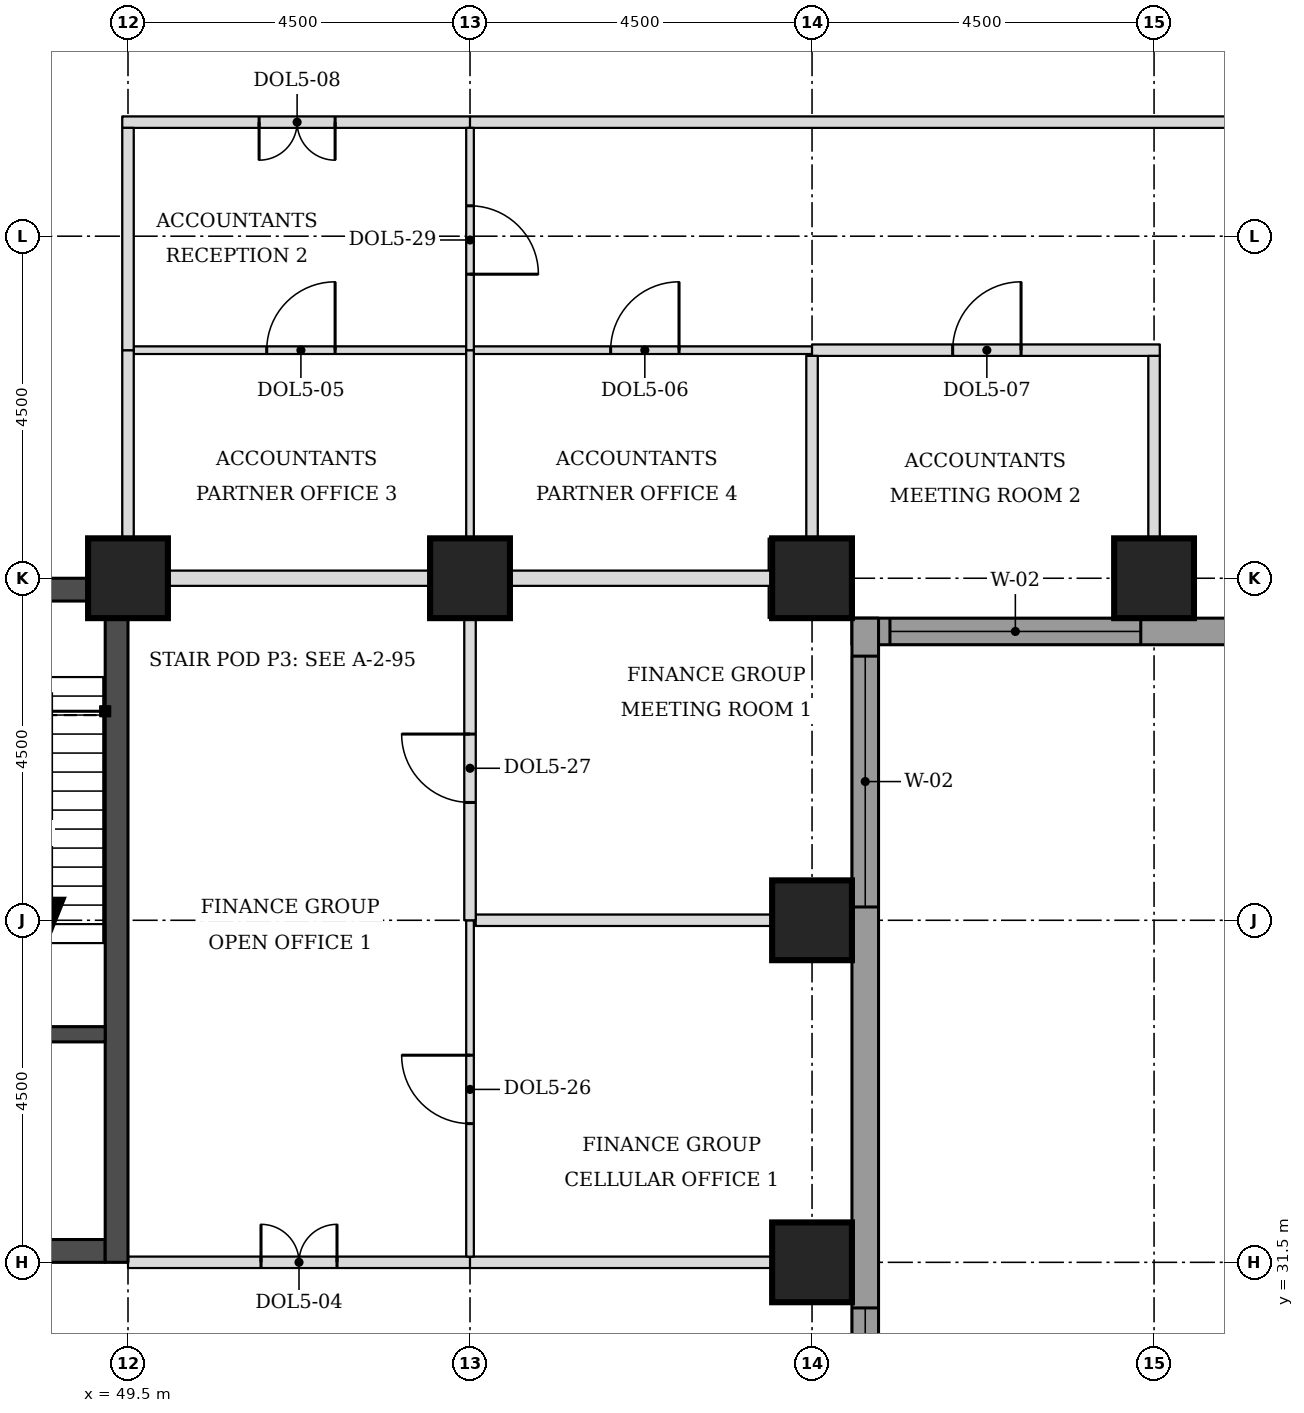
"""IFC4 building model, lengths in metres.
Left out: names, types, materials, properties, quantities, classifications, styles, units other than length and angle.
Written with IfcOpenShell. Run it as: python <this file> out.ifc"""

import sys

from ifc_helpers import new_model, si_unit, direction, frame, frame_2d, origin, origin_2d, place, context, subcontext, project, spatial, rectangle, extrude, element, fill, save


model = new_model("IFC4")
c1 = context("Model", 3, precision=1e-05, world=origin(), true_north=direction((0.0, 1.0)))
c2 = subcontext(c1, "Body", "Model", "MODEL_VIEW")
j1 = project(units=[si_unit("LENGTHUNIT", "METRE"), si_unit("PLANEANGLEUNIT", "RADIAN")], contexts=[c1])
p1 = place(None, origin())
s1 = spatial("IfcSite", under=j1, at=p1, CompositionType="ELEMENT")
p2 = place(p1, origin())
s2 = spatial("IfcBuilding", under=s1, at=p2, CompositionType="ELEMENT")
p3 = place(p2, frame((0.0, 0.0, 112.2)))
s3 = spatial("IfcBuildingStorey", under=s2, at=p3, CompositionType="ELEMENT", Elevation=112.2)
for number, where, z_axis, x_axis in (
    (1, (58.5, 31.5, 0.0), (0.0, 0.0, 1.0), (1.0, 0.0, 0.0)),
    (2, (58.5, 36.0, 0.0), (0.0, 0.0, 1.0), (1.0, 0.0, 0.0)),
    (3, (49.5, 40.5, 0.0), (0.0, 0.0, 1.0), (1.0, 0.0, 0.0)),
    (4, (54.0, 40.5, 0.0), (0.0, 0.0, 1.0), (1.0, 0.0, 0.0)),
    (5, (58.5, 40.5, 0.0), (0.0, 0.0, 1.0), (1.0, 0.0, 0.0)),
    (6, (63.0, 40.5, 0.0), (0.0, 0.0, 1.0), (1.0, 0.0, 0.0)),
):
    element("IfcColumn", number, at=place(p3, frame(where, z_axis=z_axis, x_axis=x_axis)), inside=s3, PredefinedType="COLUMN", context=c2, shape_type="SweptSolid", body=[
        extrude(rectangle(XDim=1.05, YDim=1.05, at=origin_2d()), origin(), (0.0, 0.0, 1.0), 3.7),
    ])
p4 = place(p3, frame((40.8, 31.65, 0.0), z_axis=(0.0, 0.0, 1.0), x_axis=(1.0, 0.0, 0.0)))
e7 = element("IfcWall", 7, at=p4, inside=s3, PredefinedType="SHEAR", context=c2, shape_type="SweptSolid", body=[
    extrude(rectangle(XDim=8.4, YDim=0.3, at=frame_2d((4.2, 0.0))), origin(), (0.0, 0.0, 1.0), 3.7),
])
p5 = place(p4, frame((5.2, 0.0, 0.0)))
e8 = element("IfcOpeningElement", 8, at=p5, cuts=e7, PredefinedType="OPENING", context=c2, shape_type="SweptSolid", body=[
    extrude(rectangle(XDim=1.0, YDim=2.1, at=frame_2d((0.5, 1.05))), frame((0.0, 0.16, 0.0), z_axis=(0.0, -1.0, 0.0), x_axis=(1.0, 0.0, 0.0)), (0.0, 0.0, 1.0), 0.32),
])
p6 = place(p3, frame((40.8, 40.35, 0.0), z_axis=(0.0, 0.0, 1.0), x_axis=(1.0, 0.0, 0.0)))
e9 = element("IfcWall", 9, at=p6, inside=s3, PredefinedType="SHEAR", context=c2, shape_type="SweptSolid", body=[
    extrude(rectangle(XDim=8.4, YDim=0.3, at=frame_2d((4.2, 0.0))), origin(), (0.0, 0.0, 1.0), 3.7),
])
p7 = place(p6, frame((6.4, 0.0, 0.0)))
e10 = element("IfcOpeningElement", 10, at=p7, cuts=e9, PredefinedType="OPENING", context=c2, shape_type="SweptSolid", body=[
    extrude(rectangle(XDim=1.1, YDim=2.1, at=frame_2d((0.55, 1.05))), frame((0.0, 0.16, 0.0), z_axis=(0.0, -1.0, 0.0), x_axis=(1.0, 0.0, 0.0)), (0.0, 0.0, 1.0), 0.32),
])
p8 = place(p3, frame((49.35, 31.5, 0.0), z_axis=(0.0, 0.0, 1.0), x_axis=(0.0, 1.0, 0.0)))
e11 = element("IfcWall", 11, at=p8, inside=s3, PredefinedType="SHEAR", context=c2, shape_type="SweptSolid", body=[
    extrude(rectangle(XDim=9.0, YDim=0.3, at=frame_2d((4.5, 0.0))), origin(), (0.0, 0.0, 1.0), 3.7),
])
p9 = place(p3, frame((59.025, 39.8, 0.0), z_axis=(0.0, 0.0, 1.0), x_axis=(1.0, 0.0, 0.0)))
e12 = element("IfcWall", 12, at=p9, inside=s3, PredefinedType="STANDARD", context=c2, shape_type="SweptSolid", body=[
    extrude(rectangle(XDim=13.337, YDim=0.35, at=frame_2d((6.669, 0.0))), origin(), (0.0, 0.0, 1.0), 3.525),
])
p10 = place(p9, frame((0.5, 0.0, 0.9)))
e13 = element("IfcOpeningElement", 13, at=p10, cuts=e12, PredefinedType="OPENING", context=c2, shape_type="SweptSolid", body=[
    extrude(rectangle(XDim=3.3, YDim=1.9, at=frame_2d((1.65, 0.95))), frame((0.0, 0.185, 0.0), z_axis=(0.0, -1.0, 0.0), x_axis=(1.0, 0.0, 0.0)), (0.0, 0.0, 1.0), 0.37),
])
p11 = place(p3, frame((59.2, 22.138, 0.0), z_axis=(0.0, 0.0, 1.0), x_axis=(0.0, 1.0, 0.0)))
e14 = element("IfcWall", 14, at=p11, inside=s3, PredefinedType="STANDARD", context=c2, shape_type="SweptSolid", body=[
    extrude(rectangle(XDim=17.837, YDim=0.35, at=frame_2d((8.919, 0.0))), origin(), (0.0, 0.0, 1.0), 3.525),
])
p12 = place(p11, frame((5.462, 0.0, 0.9)))
e15 = element("IfcOpeningElement", 15, at=p12, cuts=e14, PredefinedType="OPENING", context=c2, shape_type="SweptSolid", body=[
    extrude(rectangle(XDim=3.3, YDim=1.9, at=frame_2d((1.65, 0.95))), frame((0.0, 0.185, 0.0), z_axis=(0.0, -1.0, 0.0), x_axis=(1.0, 0.0, 0.0)), (0.0, 0.0, 1.0), 0.37),
])
p13 = place(p11, frame((14.037, 0.0, 0.9)))
e16 = element("IfcOpeningElement", 16, at=p13, cuts=e14, PredefinedType="OPENING", context=c2, shape_type="SweptSolid", body=[
    extrude(rectangle(XDim=3.3, YDim=1.9, at=frame_2d((1.65, 0.95))), frame((0.0, 0.185, 0.0), z_axis=(0.0, -1.0, 0.0), x_axis=(1.0, 0.0, 0.0)), (0.0, 0.0, 1.0), 0.37),
])
p14 = place(p3, frame((49.5, 31.5, 0.0), z_axis=(0.0, 0.0, 1.0), x_axis=(1.0, 0.0, 0.0)))
e17 = element("IfcWall", 17, at=p14, inside=s3, PredefinedType="PARTITIONING", context=c2, shape_type="SweptSolid", body=[
    extrude(rectangle(XDim=4.5, YDim=0.15, at=frame_2d((2.25, 0.0))), origin(), (0.0, 0.0, 1.0), 2.55),
])
p15 = place(p14, frame((1.75, 0.0, 0.0)))
e18 = element("IfcOpeningElement", 18, at=p15, cuts=e17, PredefinedType="OPENING", context=c2, shape_type="SweptSolid", body=[
    extrude(rectangle(XDim=1.0, YDim=2.1, at=frame_2d((0.5, 1.05))), frame((0.0, 0.085, 0.0), z_axis=(0.0, -1.0, 0.0), x_axis=(1.0, 0.0, 0.0)), (0.0, 0.0, 1.0), 0.17),
])
p16 = place(p3, frame((54.0, 31.5, 0.0), z_axis=(0.0, 0.0, 1.0), x_axis=(1.0, 0.0, 0.0)))
e19 = element("IfcWall", 19, at=p16, inside=s3, PredefinedType="PARTITIONING", context=c2, shape_type="SweptSolid", body=[
    extrude(rectangle(XDim=5.025, YDim=0.15, at=frame_2d((2.512, 0.0))), origin(), (0.0, 0.0, 1.0), 2.55),
])
p17 = place(p3, frame((54.075, 36.0, 0.0), z_axis=(0.0, 0.0, 1.0), x_axis=(1.0, 0.0, 0.0)))
e20 = element("IfcWall", 20, at=p17, inside=s3, PredefinedType="PARTITIONING", context=c2, shape_type="SweptSolid", body=[
    extrude(rectangle(XDim=4.95, YDim=0.15, at=frame_2d((2.475, 0.0))), origin(), (0.0, 0.0, 1.0), 3.096),
])
p18 = place(p3, frame((50.015, 40.5, 0.0), z_axis=(0.0, 0.0, 1.0), x_axis=(1.0, 0.0, 0.0)))
e21 = element("IfcWall", 21, at=p18, inside=s3, PredefinedType="PARTITIONING", context=c2, shape_type="SweptSolid", body=[
    extrude(rectangle(XDim=3.46, YDim=0.2, at=frame_2d((1.73, 0.0))), origin(), (0.0, 0.0, 1.0), 2.8),
])
p19 = place(p3, frame((54.495, 40.5, 0.0), z_axis=(0.0, 0.0, 1.0), x_axis=(1.0, 0.0, 0.0)))
e22 = element("IfcWall", 22, at=p19, inside=s3, PredefinedType="PARTITIONING", context=c2, shape_type="SweptSolid", body=[
    extrude(rectangle(XDim=3.48, YDim=0.2, at=frame_2d((1.74, 0.0))), origin(), (0.0, 0.0, 1.0), 2.8),
])
p20 = place(p3, frame((49.575, 43.5, 0.0), z_axis=(0.0, 0.0, 1.0), x_axis=(1.0, 0.0, 0.0)))
e23 = element("IfcWall", 23, at=p20, inside=s3, PredefinedType="PARTITIONING", context=c2, shape_type="SweptSolid", body=[
    extrude(rectangle(XDim=4.375, YDim=0.1, at=frame_2d((2.188, 0.0))), origin(), (0.0, 0.0, 1.0), 3.55),
])
p21 = place(p20, frame((1.75, 0.0, 0.0)))
e24 = element("IfcOpeningElement", 24, at=p21, cuts=e23, PredefinedType="OPENING", context=c2, shape_type="SweptSolid", body=[
    extrude(rectangle(XDim=0.9, YDim=2.1, at=frame_2d((0.45, 1.05))), frame((0.0, 0.06, 0.0), z_axis=(0.0, -1.0, 0.0), x_axis=(1.0, 0.0, 0.0)), (0.0, 0.0, 1.0), 0.12),
])
p22 = place(p3, frame((54.05, 43.5, 0.0), z_axis=(0.0, 0.0, 1.0), x_axis=(1.0, 0.0, 0.0)))
e25 = element("IfcWall", 25, at=p22, inside=s3, PredefinedType="PARTITIONING", context=c2, shape_type="SweptSolid", body=[
    extrude(rectangle(XDim=4.45, YDim=0.1, at=frame_2d((2.225, 0.0))), origin(), (0.0, 0.0, 1.0), 3.55),
])
p23 = place(p22, frame((1.8, 0.0, 0.0)))
e26 = element("IfcOpeningElement", 26, at=p23, cuts=e25, PredefinedType="OPENING", context=c2, shape_type="SweptSolid", body=[
    extrude(rectangle(XDim=0.9, YDim=2.1, at=frame_2d((0.45, 1.05))), frame((0.0, 0.06, 0.0), z_axis=(0.0, -1.0, 0.0), x_axis=(1.0, 0.0, 0.0)), (0.0, 0.0, 1.0), 0.12),
])
p24 = place(p3, frame((58.5, 43.5, 0.0), z_axis=(0.0, 0.0, 1.0), x_axis=(1.0, 0.0, 0.0)))
e27 = element("IfcWall", 27, at=p24, inside=s3, PredefinedType="PARTITIONING", context=c2, shape_type="SweptSolid", body=[
    extrude(rectangle(XDim=4.575, YDim=0.15, at=frame_2d((2.288, 0.0))), origin(), (0.0, 0.0, 1.0), 3.55),
])
p25 = place(p24, frame((1.85, 0.0, 0.0)))
e28 = element("IfcOpeningElement", 28, at=p25, cuts=e27, PredefinedType="OPENING", context=c2, shape_type="SweptSolid", body=[
    extrude(rectangle(XDim=0.9, YDim=2.1, at=frame_2d((0.45, 1.05))), frame((0.0, 0.085, 0.0), z_axis=(0.0, -1.0, 0.0), x_axis=(1.0, 0.0, 0.0)), (0.0, 0.0, 1.0), 0.17),
])
p26 = place(p3, frame((49.425, 46.5, 0.0), z_axis=(0.0, 0.0, 1.0), x_axis=(1.0, 0.0, 0.0)))
e29 = element("IfcWall", 29, at=p26, inside=s3, PredefinedType="PARTITIONING", context=c2, shape_type="SweptSolid", body=[
    extrude(rectangle(XDim=4.575, YDim=0.15, at=frame_2d((2.288, 0.0))), origin(), (0.0, 0.0, 1.0), 3.55),
])
p27 = place(p26, frame((1.8, 0.0, 0.0)))
e30 = element("IfcOpeningElement", 30, at=p27, cuts=e29, PredefinedType="OPENING", context=c2, shape_type="SweptSolid", body=[
    extrude(rectangle(XDim=1.0, YDim=2.1, at=frame_2d((0.5, 1.05))), frame((0.0, 0.085, 0.0), z_axis=(0.0, -1.0, 0.0), x_axis=(1.0, 0.0, 0.0)), (0.0, 0.0, 1.0), 0.17),
])
p28 = place(p3, frame((54.0, 46.5, 0.0), z_axis=(0.0, 0.0, 1.0), x_axis=(1.0, 0.0, 0.0)))
e31 = element("IfcWall", 31, at=p28, inside=s3, PredefinedType="PARTITIONING", context=c2, shape_type="SweptSolid", body=[
    extrude(rectangle(XDim=16.5, YDim=0.15, at=frame_2d((8.25, 0.0))), origin(), (0.0, 0.0, 1.0), 3.55),
])
p29 = place(p3, frame((54.0, 31.575, 0.0), z_axis=(0.0, 0.0, 1.0), x_axis=(0.0, 1.0, 0.0)))
e32 = element("IfcWall", 32, at=p29, inside=s3, PredefinedType="PARTITIONING", context=c2, shape_type="SweptSolid", body=[
    extrude(rectangle(XDim=4.425, YDim=0.1, at=frame_2d((2.212, 0.0))), origin(), (0.0, 0.0, 1.0), 3.55),
])
p30 = place(p29, frame((1.75, 0.0, 0.0)))
e33 = element("IfcOpeningElement", 33, at=p30, cuts=e32, PredefinedType="OPENING", context=c2, shape_type="SweptSolid", body=[
    extrude(rectangle(XDim=0.9, YDim=2.1, at=frame_2d((0.45, 1.05))), frame((0.0, 0.06, 0.0), z_axis=(0.0, -1.0, 0.0), x_axis=(1.0, 0.0, 0.0)), (0.0, 0.0, 1.0), 0.12),
])
p31 = place(p3, frame((54.0, 36.0, 0.0), z_axis=(0.0, 0.0, 1.0), x_axis=(0.0, 1.0, 0.0)))
e34 = element("IfcWall", 34, at=p31, inside=s3, PredefinedType="PARTITIONING", context=c2, shape_type="SweptSolid", body=[
    extrude(rectangle(XDim=3.975, YDim=0.15, at=frame_2d((1.988, 0.0))), origin(), (0.0, 0.0, 1.0), 3.55),
])
p32 = place(p31, frame((1.55, 0.0, 0.0)))
e35 = element("IfcOpeningElement", 35, at=p32, cuts=e34, PredefinedType="OPENING", context=c2, shape_type="SweptSolid", body=[
    extrude(rectangle(XDim=0.9, YDim=2.1, at=frame_2d((0.45, 1.05))), frame((0.0, 0.085, 0.0), z_axis=(0.0, -1.0, 0.0), x_axis=(1.0, 0.0, 0.0)), (0.0, 0.0, 1.0), 0.17),
])
p33 = place(p3, frame((63.0, 39.975, 0.0), z_axis=(0.0, 0.0, 1.0), x_axis=(0.0, 1.0, 0.0)))
e36 = element("IfcWall", 36, at=p33, inside=s3, PredefinedType="PARTITIONING", context=c2, shape_type="SweptSolid", body=[
    extrude(rectangle(XDim=3.45, YDim=0.15, at=frame_2d((1.725, 0.0))), origin(), (0.0, 0.0, 1.0), 3.55),
])
p34 = place(p3, frame((49.5, 41.025, 0.0), z_axis=(0.0, 0.0, 1.0), x_axis=(0.0, 1.0, 0.0)))
e37 = element("IfcWall", 37, at=p34, inside=s3, PredefinedType="PARTITIONING", context=c2, shape_type="SweptSolid", body=[
    extrude(rectangle(XDim=2.475, YDim=0.15, at=frame_2d((1.238, 0.0))), origin(), (0.0, 0.0, 1.0), 3.55),
])
p35 = place(p3, frame((54.0, 41.025, 0.0), z_axis=(0.0, 0.0, 1.0), x_axis=(0.0, 1.0, 0.0)))
e38 = element("IfcWall", 38, at=p35, inside=s3, PredefinedType="PARTITIONING", context=c2, shape_type="SweptSolid", body=[
    extrude(rectangle(XDim=2.475, YDim=0.1, at=frame_2d((1.238, 0.0))), origin(), (0.0, 0.0, 1.0), 3.55),
])
p36 = place(p3, frame((58.5, 41.025, 0.0), z_axis=(0.0, 0.0, 1.0), x_axis=(0.0, 1.0, 0.0)))
e39 = element("IfcWall", 39, at=p36, inside=s3, PredefinedType="PARTITIONING", context=c2, shape_type="SweptSolid", body=[
    extrude(rectangle(XDim=2.4, YDim=0.15, at=frame_2d((1.2, 0.0))), origin(), (0.0, 0.0, 1.0), 3.55),
])
p37 = place(p3, frame((49.5, 43.5, 0.0), z_axis=(0.0, 0.0, 1.0), x_axis=(0.0, 1.0, 0.0)))
e40 = element("IfcWall", 40, at=p37, inside=s3, PredefinedType="PARTITIONING", context=c2, shape_type="SweptSolid", body=[
    extrude(rectangle(XDim=2.925, YDim=0.15, at=frame_2d((1.462, 0.0))), origin(), (0.0, 0.0, 1.0), 3.55),
])
p38 = place(p3, frame((54.0, 43.5, 0.0), z_axis=(0.0, 0.0, 1.0), x_axis=(0.0, 1.0, 0.0)))
e41 = element("IfcWall", 41, at=p38, inside=s3, PredefinedType="PARTITIONING", context=c2, shape_type="SweptSolid", body=[
    extrude(rectangle(XDim=2.925, YDim=0.1, at=frame_2d((1.462, 0.0))), origin(), (0.0, 0.0, 1.0), 3.55),
])
p39 = place(p38, frame((1.0, 0.0, 0.0)))
e42 = element("IfcOpeningElement", 42, at=p39, cuts=e41, PredefinedType="OPENING", context=c2, shape_type="SweptSolid", body=[
    extrude(rectangle(XDim=0.9, YDim=2.1, at=frame_2d((0.45, 1.05))), frame((0.0, 0.06, 0.0), z_axis=(0.0, -1.0, 0.0), x_axis=(1.0, 0.0, 0.0)), (0.0, 0.0, 1.0), 0.12),
])
p40 = place(p3, frame((46.2, 34.5, 0.0), z_axis=(0.0, 0.0, 1.0), x_axis=(1.0, 0.0, 0.0)))
e43 = element("IfcWall", 43, at=p40, inside=s3, PredefinedType="SOLIDWALL", context=c2, shape_type="SweptSolid", body=[
    extrude(rectangle(XDim=3.0, YDim=0.2, at=frame_2d((1.5, 0.0))), origin(), (0.0, 0.0, 1.0), 3.55),
])
p41 = place(p10, origin())
e44 = element("IfcWindow", 44, at=p41, inside=s3, PartitioningType="SINGLE_PANEL", PredefinedType="WINDOW", context=c2, shape_type="SweptSolid", body=[
    extrude(rectangle(XDim=3.3, YDim=1.9, at=frame_2d((1.65, 0.95))), frame((0.0, 0.085, 0.0), z_axis=(0.0, -1.0, 0.0), x_axis=(1.0, 0.0, 0.0)), (0.0, 0.0, 1.0), 0.06),
])
fill(e13, e44)
p42 = place(p12, origin())
e45 = element("IfcWindow", 45, at=p42, inside=s3, PartitioningType="SINGLE_PANEL", PredefinedType="WINDOW", context=c2, shape_type="SweptSolid", body=[
    extrude(rectangle(XDim=3.3, YDim=1.9, at=frame_2d((1.65, 0.95))), frame((0.0, 0.085, 0.0), z_axis=(0.0, -1.0, 0.0), x_axis=(1.0, 0.0, 0.0)), (0.0, 0.0, 1.0), 0.06),
])
fill(e15, e45)
p43 = place(p13, origin())
e46 = element("IfcWindow", 46, at=p43, inside=s3, PartitioningType="SINGLE_PANEL", PredefinedType="WINDOW", context=c2, shape_type="SweptSolid", body=[
    extrude(rectangle(XDim=3.3, YDim=1.9, at=frame_2d((1.65, 0.95))), frame((0.0, 0.085, 0.0), z_axis=(0.0, -1.0, 0.0), x_axis=(1.0, 0.0, 0.0)), (0.0, 0.0, 1.0), 0.06),
])
fill(e16, e46)
p44 = place(p15, origin())
e47 = element("IfcDoor", 47, at=p44, inside=s3, OperationType="DOUBLE_DOOR_SINGLE_SWING", PredefinedType="DOOR", context=c2, shape_type="SweptSolid", body=[
    extrude(rectangle(XDim=1.0, YDim=2.1, at=frame_2d((0.5, 1.05))), frame((0.0, 0.025, 0.0), z_axis=(0.0, -1.0, 0.0), x_axis=(1.0, 0.0, 0.0)), (0.0, 0.0, 1.0), 0.05),
])
fill(e18, e47)
p45 = place(p30, origin())
e48 = element("IfcDoor", 48, at=p45, inside=s3, OperationType="SINGLE_SWING_RIGHT", PredefinedType="DOOR", context=c2, shape_type="SweptSolid", body=[
    extrude(rectangle(XDim=0.9, YDim=2.1, at=frame_2d((0.45, 1.05))), frame((0.0, 0.025, 0.0), z_axis=(0.0, -1.0, 0.0), x_axis=(1.0, 0.0, 0.0)), (0.0, 0.0, 1.0), 0.05),
])
fill(e33, e48)
p46 = place(p32, origin())
e49 = element("IfcDoor", 49, at=p46, inside=s3, OperationType="SINGLE_SWING_RIGHT", PredefinedType="DOOR", context=c2, shape_type="SweptSolid", body=[
    extrude(rectangle(XDim=0.9, YDim=2.1, at=frame_2d((0.45, 1.05))), frame((0.0, 0.025, 0.0), z_axis=(0.0, -1.0, 0.0), x_axis=(1.0, 0.0, 0.0)), (0.0, 0.0, 1.0), 0.05),
])
fill(e35, e49)
p47 = place(p27, frame((1.0, 0.0, 0.0), z_axis=(0.0, 0.0, 1.0), x_axis=(-1.0, 0.0, 0.0)))
e50 = element("IfcDoor", 50, at=p47, inside=s3, OperationType="DOUBLE_DOOR_SINGLE_SWING", PredefinedType="DOOR", context=c2, shape_type="SweptSolid", body=[
    extrude(rectangle(XDim=1.0, YDim=2.1, at=frame_2d((0.5, 1.05))), frame((0.0, 0.025, 0.0), z_axis=(0.0, -1.0, 0.0), x_axis=(1.0, 0.0, 0.0)), (0.0, 0.0, 1.0), 0.05),
])
fill(e30, e50)
p48 = place(p39, frame((0.9, 0.0, 0.0), z_axis=(0.0, 0.0, 1.0), x_axis=(-1.0, 0.0, 0.0)))
e51 = element("IfcDoor", 51, at=p48, inside=s3, OperationType="SINGLE_SWING_RIGHT", PredefinedType="DOOR", context=c2, shape_type="SweptSolid", body=[
    extrude(rectangle(XDim=0.9, YDim=2.1, at=frame_2d((0.45, 1.05))), frame((0.0, 0.025, 0.0), z_axis=(0.0, -1.0, 0.0), x_axis=(1.0, 0.0, 0.0)), (0.0, 0.0, 1.0), 0.05),
])
fill(e42, e51)
p49 = place(p21, origin())
e52 = element("IfcDoor", 52, at=p49, inside=s3, OperationType="SINGLE_SWING_RIGHT", PredefinedType="DOOR", context=c2, shape_type="SweptSolid", body=[
    extrude(rectangle(XDim=0.9, YDim=2.1, at=frame_2d((0.45, 1.05))), frame((0.0, 0.025, 0.0), z_axis=(0.0, -1.0, 0.0), x_axis=(1.0, 0.0, 0.0)), (0.0, 0.0, 1.0), 0.05),
])
fill(e24, e52)
p50 = place(p23, origin())
e53 = element("IfcDoor", 53, at=p50, inside=s3, OperationType="SINGLE_SWING_RIGHT", PredefinedType="DOOR", context=c2, shape_type="SweptSolid", body=[
    extrude(rectangle(XDim=0.9, YDim=2.1, at=frame_2d((0.45, 1.05))), frame((0.0, 0.025, 0.0), z_axis=(0.0, -1.0, 0.0), x_axis=(1.0, 0.0, 0.0)), (0.0, 0.0, 1.0), 0.05),
])
fill(e26, e53)
p51 = place(p25, origin())
e54 = element("IfcDoor", 54, at=p51, inside=s3, OperationType="SINGLE_SWING_RIGHT", PredefinedType="DOOR", context=c2, shape_type="SweptSolid", body=[
    extrude(rectangle(XDim=0.9, YDim=2.1, at=frame_2d((0.45, 1.05))), frame((0.0, 0.025, 0.0), z_axis=(0.0, -1.0, 0.0), x_axis=(1.0, 0.0, 0.0)), (0.0, 0.0, 1.0), 0.05),
])
fill(e28, e54)
save(model, sys.argv[1])
